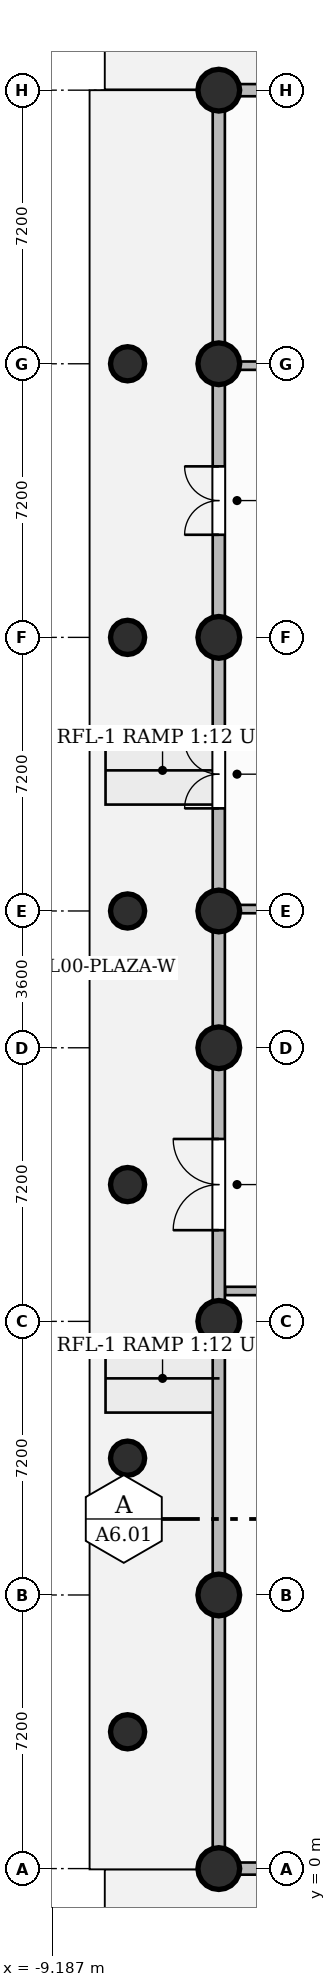
"""IFC4 building model, lengths in metres.
Left out: names, types, materials, properties, quantities, classifications, styles, units other than length and angle.
Written with IfcOpenShell. Run it as: python <this file> out.ifc"""

import sys

from ifc_helpers import new_model, si_unit, direction, frame, frame_2d, origin, origin_2d, place, context, subcontext, project, spatial, rectangle, circle, extrude, source, transform, mapped, element, fill, save


model = new_model("IFC4")
c1 = context("Model", 3, precision=1e-05, world=origin(), true_north=direction((0.0, 1.0)))
c2 = subcontext(c1, "Body", "Model", "MODEL_VIEW")
j1 = project(units=[si_unit("LENGTHUNIT", "METRE"), si_unit("PLANEANGLEUNIT", "RADIAN")], contexts=[c1])
p1 = place(None, origin())
s1 = spatial("IfcSite", under=j1, at=p1, CompositionType="ELEMENT")
p2 = place(p1, origin())
s2 = spatial("IfcBuilding", under=s1, at=p2, CompositionType="ELEMENT")
p3 = place(p2, origin())
s3 = spatial("IfcBuildingStorey", under=s2, at=p3, CompositionType="ELEMENT", Elevation=0.0)
m1 = source(origin(), c2, "Body", "SweptSolid", [
    extrude(circle(Radius=0.55, at=origin_2d()), origin(), (0.0, 0.0, 1.0), 5.4),
])
for number, where, z_axis, x_axis in (
    (1, (-4.8, 0.0, 0.0), (0.0, 0.0, 1.0), (1.0, 0.0, 0.0)),
    (2, (-4.8, 7.2, 0.0), (0.0, 0.0, 1.0), (1.0, 0.0, 0.0)),
    (3, (-4.8, 14.4, 0.0), (0.0, 0.0, 1.0), (1.0, 0.0, 0.0)),
    (4, (-4.8, 21.6, 0.0), (0.0, 0.0, 1.0), (1.0, 0.0, 0.0)),
    (5, (-4.8, 25.2, 0.0), (0.0, 0.0, 1.0), (1.0, 0.0, 0.0)),
    (6, (-4.8, 32.4, 0.0), (0.0, 0.0, 1.0), (1.0, 0.0, 0.0)),
    (7, (-4.8, 39.6, 0.0), (0.0, 0.0, 1.0), (1.0, 0.0, 0.0)),
    (8, (-4.8, 46.8, 0.0), (0.0, 0.0, 1.0), (1.0, 0.0, 0.0)),
):
    element("IfcColumn", number, at=place(p3, frame(where, z_axis=z_axis, x_axis=x_axis)), inside=s3, PredefinedType="COLUMN", context=c2, shape_type="MappedRepresentation", body=[
        mapped(m1, transform((0.0, 0.0, 0.0), scale=1.0)),
    ])
m2 = source(origin(), c2, "Body", "SweptSolid", [
    extrude(circle(Radius=0.45, at=origin_2d()), origin(), (0.0, 0.0, 1.0), 5.4),
])
for number, where, z_axis, x_axis in (
    (9, (-7.2, 3.6, 0.0), (0.0, 0.0, 1.0), (1.0, 0.0, 0.0)),
    (10, (-7.2, 10.8, 0.0), (0.0, 0.0, 1.0), (1.0, 0.0, 0.0)),
    (11, (-7.2, 18.0, 0.0), (0.0, 0.0, 1.0), (1.0, 0.0, 0.0)),
    (12, (-7.2, 25.2, 0.0), (0.0, 0.0, 1.0), (1.0, 0.0, 0.0)),
    (13, (-7.2, 32.4, 0.0), (0.0, 0.0, 1.0), (1.0, 0.0, 0.0)),
    (14, (-7.2, 39.6, 0.0), (0.0, 0.0, 1.0), (1.0, 0.0, 0.0)),
):
    element("IfcColumn", number, at=place(p3, frame(where, z_axis=z_axis, x_axis=x_axis)), inside=s3, PredefinedType="COLUMN", context=c2, shape_type="MappedRepresentation", body=[
        mapped(m2, transform((0.0, 0.0, 0.0), scale=1.0)),
    ])
p4 = place(p3, frame((-4.41, 25.25, 0.0), z_axis=(0.0, 0.0, 1.0), x_axis=(1.0, 0.0, 0.0)))
e15 = element("IfcWall", 15, at=p4, inside=s3, PredefinedType="PARTITIONING", context=c2, shape_type="SweptSolid", body=[
    extrude(rectangle(XDim=7.62, YDim=0.22, at=frame_2d((3.81, 0.0))), origin(), (0.0, 0.0, 1.0), 4.085),
])
p5 = place(p4, frame((2.144, 0.0, 0.0)))
e16 = element("IfcOpeningElement", 16, at=p5, cuts=e15, PredefinedType="OPENING", context=c2, shape_type="SweptSolid", body=[
    extrude(rectangle(XDim=1.5, YDim=2.2, at=frame_2d((0.75, 1.1))), frame((0.0, 0.12, 0.0), z_axis=(0.0, -1.0, 0.0), x_axis=(1.0, 0.0, 0.0)), (0.0, 0.0, 1.0), 0.24),
])
p6 = place(p3, frame((-4.41, 39.55, 0.0), z_axis=(0.0, 0.0, 1.0), x_axis=(1.0, 0.0, 0.0)))
e17 = element("IfcWall", 17, at=p6, inside=s3, PredefinedType="PARTITIONING", context=c2, shape_type="SweptSolid", body=[
    extrude(rectangle(XDim=7.62, YDim=0.22, at=frame_2d((3.81, 0.0))), origin(), (0.0, 0.0, 1.0), 4.085),
])
p7 = place(p3, frame((-4.632, 15.2, 0.0), z_axis=(0.0, 0.0, 1.0), x_axis=(1.0, 0.0, 0.0)))
e18 = element("IfcWall", 18, at=p7, inside=s3, PredefinedType="PARTITIONING", context=c2, shape_type="SweptSolid", body=[
    extrude(rectangle(XDim=13.142, YDim=0.22, at=frame_2d((6.571, 0.0))), origin(), (0.0, 0.0, 1.0), 5.1),
])
p8 = place(p7, frame((1.907, 0.0, 0.0)))
e19 = element("IfcOpeningElement", 19, at=p8, cuts=e18, PredefinedType="OPENING", context=c2, shape_type="SweptSolid", body=[
    extrude(rectangle(XDim=1.05, YDim=2.15, at=frame_2d((0.525, 1.075))), frame((0.0, 0.12, 0.0), z_axis=(0.0, -1.0, 0.0), x_axis=(1.0, 0.0, 0.0)), (0.0, 0.0, 1.0), 0.24),
])
p9 = place(p3, frame((-4.8, 0.0, 0.0), z_axis=(0.0, 0.0, 1.0), x_axis=(1.0, 0.0, 0.0)))
e20 = element("IfcWall", 20, at=p9, inside=s3, PredefinedType="SOLIDWALL", context=c2, shape_type="SweptSolid", body=[
    extrude(rectangle(XDim=26.85, YDim=0.32, at=frame_2d((13.425, 0.0))), origin(), (0.0, 0.0, 1.0), 4.085),
])
p10 = place(p9, frame((6.45, 0.0, 0.0)))
e21 = element("IfcOpeningElement", 21, at=p10, cuts=e20, PredefinedType="OPENING", context=c2, shape_type="SweptSolid", body=[
    extrude(rectangle(XDim=4.0, YDim=3.2, at=frame_2d((2.0, 1.6))), frame((0.0, 0.17, 0.0), z_axis=(0.0, -1.0, 0.0), x_axis=(1.0, 0.0, 0.0)), (0.0, 0.0, 1.0), 0.34),
])
p11 = place(p9, frame((21.6, 0.0, 0.0)))
e22 = element("IfcOpeningElement", 22, at=p11, cuts=e20, PredefinedType="OPENING", context=c2, shape_type="SweptSolid", body=[
    extrude(rectangle(XDim=2.4, YDim=2.8, at=frame_2d((1.2, 1.4))), frame((0.0, 0.17, 0.0), z_axis=(0.0, -1.0, 0.0), x_axis=(1.0, 0.0, 0.0)), (0.0, 0.0, 1.0), 0.34),
])
p12 = place(p3, frame((-4.8, 46.8, 0.0), z_axis=(0.0, 0.0, 1.0), x_axis=(1.0, 0.0, 0.0)))
e23 = element("IfcWall", 23, at=p12, inside=s3, PredefinedType="SOLIDWALL", context=c2, shape_type="SweptSolid", body=[
    extrude(rectangle(XDim=26.85, YDim=0.32, at=frame_2d((13.425, 0.0))), origin(), (0.0, 0.0, 1.0), 4.085),
])
p13 = place(p3, frame((-4.8, 0.05, 0.0), z_axis=(0.0, 0.0, 1.0), x_axis=(0.0, 1.0, 0.0)))
e24 = element("IfcWall", 24, at=p13, inside=s3, PredefinedType="SOLIDWALL", context=c2, shape_type="SweptSolid", body=[
    extrude(rectangle(XDim=46.7, YDim=0.32, at=frame_2d((23.35, 0.0))), origin(), (0.0, 0.0, 1.0), 4.085),
])
p14 = place(p13, frame((16.75, 0.0, 0.0)))
e25 = element("IfcOpeningElement", 25, at=p14, cuts=e24, PredefinedType="OPENING", context=c2, shape_type="SweptSolid", body=[
    extrude(rectangle(XDim=2.4, YDim=2.8, at=frame_2d((1.2, 1.4))), frame((0.0, 0.17, 0.0), z_axis=(0.0, -1.0, 0.0), x_axis=(1.0, 0.0, 0.0)), (0.0, 0.0, 1.0), 0.34),
])
p15 = place(p13, frame((27.85, 0.0, 0.0)))
e26 = element("IfcOpeningElement", 26, at=p15, cuts=e24, PredefinedType="OPENING", context=c2, shape_type="SweptSolid", body=[
    extrude(rectangle(XDim=1.8, YDim=2.4, at=frame_2d((0.9, 1.2))), frame((0.0, 0.17, 0.0), z_axis=(0.0, -1.0, 0.0), x_axis=(1.0, 0.0, 0.0)), (0.0, 0.0, 1.0), 0.34),
])
p16 = place(p13, frame((35.05, 0.0, 0.0)))
e27 = element("IfcOpeningElement", 27, at=p16, cuts=e24, PredefinedType="OPENING", context=c2, shape_type="SweptSolid", body=[
    extrude(rectangle(XDim=1.8, YDim=2.4, at=frame_2d((0.9, 1.2))), frame((0.0, 0.17, 0.0), z_axis=(0.0, -1.0, 0.0), x_axis=(1.0, 0.0, 0.0)), (0.0, 0.0, 1.0), 0.34),
])
m3 = source(origin(), c2, "Body", "SweptSolid", [
    extrude(rectangle(XDim=2.4, YDim=2.8, at=frame_2d((1.2, 1.4))), frame((0.0, 0.025, 0.0), z_axis=(0.0, -1.0, 0.0), x_axis=(1.0, 0.0, 0.0)), (0.0, 0.0, 1.0), 0.05),
])
p17 = place(p14, origin())
e28 = element("IfcDoor", 28, at=p17, inside=s3, OperationType="DOUBLE_DOOR_SINGLE_SWING", PredefinedType="DOOR", context=c2, shape_type="MappedRepresentation", body=[
    mapped(m3, transform((0.0, 0.0, 0.0), scale=1.0)),
])
fill(e25, e28)
m4 = source(origin(), c2, "Body", "SweptSolid", [
    extrude(rectangle(XDim=1.8, YDim=2.4, at=frame_2d((0.9, 1.2))), frame((0.0, 0.025, 0.0), z_axis=(0.0, -1.0, 0.0), x_axis=(1.0, 0.0, 0.0)), (0.0, 0.0, 1.0), 0.05),
])
p18 = place(p15, origin())
e29 = element("IfcDoor", 29, at=p18, inside=s3, OperationType="DOUBLE_DOOR_SINGLE_SWING", PredefinedType="DOOR", context=c2, shape_type="MappedRepresentation", body=[
    mapped(m4, transform((0.0, 0.0, 0.0), scale=1.0)),
])
fill(e26, e29)
p19 = place(p16, origin())
e30 = element("IfcDoor", 30, at=p19, inside=s3, OperationType="DOUBLE_DOOR_SINGLE_SWING", PredefinedType="DOOR", context=c2, shape_type="MappedRepresentation", body=[
    mapped(m4, transform((0.0, 0.0, 0.0), scale=1.0)),
])
fill(e27, e30)
save(model, sys.argv[1])
